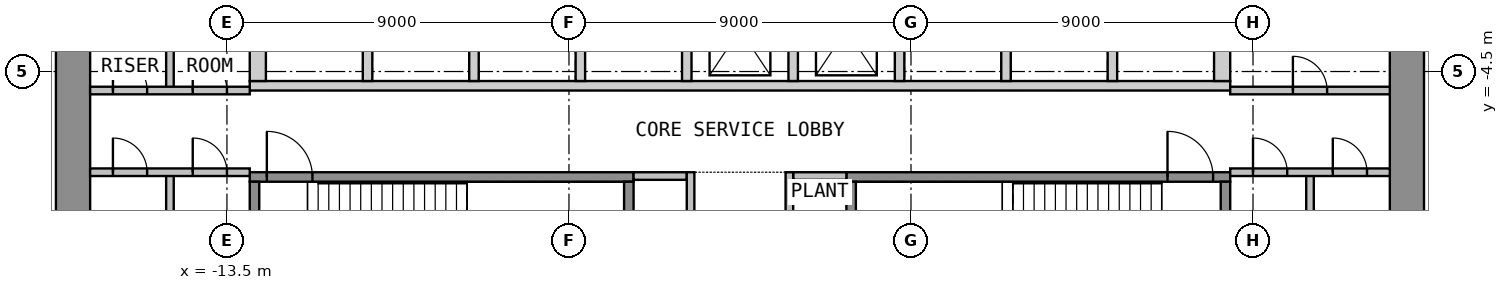
"""IFC4 building model, lengths in metres.
Left out: names, types, materials, properties, quantities, classifications, styles, units other than length and angle.
Written with IfcOpenShell. Run it as: python <this file> out.ifc"""

import sys

from ifc_helpers import new_model, si_unit, direction, frame, frame_2d, origin, place, context, subcontext, project, spatial, polyline, rectangle, outline, extrude, element, fill, save


model = new_model("IFC4")
c1 = context("Model", 3, precision=1e-05, world=origin(), true_north=direction((0.0, 1.0)))
c2 = subcontext(c1, "Body", "Model", "MODEL_VIEW")
j1 = project(units=[si_unit("LENGTHUNIT", "METRE"), si_unit("PLANEANGLEUNIT", "RADIAN")], contexts=[c1])
p1 = place(None, origin())
s1 = spatial("IfcSite", under=j1, at=p1, CompositionType="ELEMENT")
p2 = place(p1, origin())
s2 = spatial("IfcBuilding", under=s1, at=p2, CompositionType="ELEMENT")
p3 = place(p2, frame((0.0, 0.0, -5.0)))
s3 = spatial("IfcBuildingStorey", under=s2, at=p3, CompositionType="ELEMENT", Elevation=-5.0)
p4 = place(p3, frame((-17.55, -12.6, 0.0), z_axis=(0.0, 0.0, 1.0), x_axis=(0.0, 1.0, 0.0)))
e1 = element("IfcWall", 1, at=p4, inside=s3, PredefinedType="SHEAR", context=c2, shape_type="SweptSolid", body=[
    extrude(rectangle(XDim=25.2, YDim=0.9, at=frame_2d((12.6, 0.0))), origin(), (0.0, 0.0, 1.0), 4.55),
])
p5 = place(p4, frame((11.4, 0.0, 0.0)))
e2 = element("IfcOpeningElement", 2, at=p5, cuts=e1, PredefinedType="OPENING", context=c2, shape_type="SweptSolid", body=[
    extrude(rectangle(XDim=2.4, YDim=2.1, at=frame_2d((1.2, 1.05))), frame((0.0, 0.46, 0.0), z_axis=(0.0, -1.0, 0.0), x_axis=(1.0, 0.0, 0.0)), (0.0, 0.0, 1.0), 0.92),
])
p6 = place(p3, frame((17.55, -12.6, 0.0), z_axis=(0.0, 0.0, 1.0), x_axis=(0.0, 1.0, 0.0)))
e3 = element("IfcWall", 3, at=p6, inside=s3, PredefinedType="SHEAR", context=c2, shape_type="SweptSolid", body=[
    extrude(rectangle(XDim=25.2, YDim=0.9, at=frame_2d((12.6, 0.0))), origin(), (0.0, 0.0, 1.0), 4.55),
])
p7 = place(p6, frame((11.4, 0.0, 0.0)))
e4 = element("IfcOpeningElement", 4, at=p7, cuts=e3, PredefinedType="OPENING", context=c2, shape_type="SweptSolid", body=[
    extrude(rectangle(XDim=2.4, YDim=2.1, at=frame_2d((1.2, 1.05))), frame((0.0, 0.46, 0.0), z_axis=(0.0, -1.0, 0.0), x_axis=(1.0, 0.0, 0.0)), (0.0, 0.0, 1.0), 0.92),
])
p8 = place(p3, origin())
e5 = element("IfcWall", 5, at=p8, inside=s3, PredefinedType="SHEAR", context=c2, shape_type="SweptSolid", body=[
    extrude(outline(polyline([(-12.9, -5.0), (12.9, -5.0), (12.9, -4.75), (-12.9, -4.75), (-12.9, -5.0)])), origin(), (0.0, 0.0, 1.0), 4.55),
])
p9 = place(p3, origin())
e6 = element("IfcWall", 6, at=p9, inside=s3, PredefinedType="SHEAR", context=c2, shape_type="SweptSolid", body=[
    extrude(outline(polyline([(-12.9, -4.75), (-12.475, -4.75), (-12.475, -2.05), (-12.9, -2.05), (-12.9, -4.75)])), origin(), (0.0, 0.0, 1.0), 4.55),
])
p10 = place(p3, origin())
e7 = element("IfcWall", 7, at=p10, inside=s3, PredefinedType="SHEAR", context=c2, shape_type="SweptSolid", body=[
    extrude(outline(polyline([(-9.925, -4.75), (-9.675, -4.75), (-9.675, -2.05), (-9.925, -2.05), (-9.925, -4.75)])), origin(), (0.0, 0.0, 1.0), 4.55),
])
p11 = place(p3, origin())
e8 = element("IfcWall", 8, at=p11, inside=s3, PredefinedType="SHEAR", context=c2, shape_type="SweptSolid", body=[
    extrude(outline(polyline([(-7.125, -4.75), (-6.875, -4.75), (-6.875, -2.05), (-7.125, -2.05), (-7.125, -4.75)])), origin(), (0.0, 0.0, 1.0), 4.55),
])
p12 = place(p3, origin())
e9 = element("IfcWall", 9, at=p12, inside=s3, PredefinedType="SHEAR", context=c2, shape_type="SweptSolid", body=[
    extrude(outline(polyline([(-4.325, -4.75), (-4.075, -4.75), (-4.075, -2.05), (-4.325, -2.05), (-4.325, -4.75)])), origin(), (0.0, 0.0, 1.0), 4.55),
])
p13 = place(p3, origin())
e10 = element("IfcWall", 10, at=p13, inside=s3, PredefinedType="SHEAR", context=c2, shape_type="SweptSolid", body=[
    extrude(outline(polyline([(-1.525, -4.75), (-1.275, -4.75), (-1.275, -2.05), (-1.525, -2.05), (-1.525, -4.75)])), origin(), (0.0, 0.0, 1.0), 4.55),
])
p14 = place(p3, origin())
e11 = element("IfcWall", 11, at=p14, inside=s3, PredefinedType="SHEAR", context=c2, shape_type="SweptSolid", body=[
    extrude(outline(polyline([(1.275, -4.75), (1.525, -4.75), (1.525, -2.05), (1.275, -2.05), (1.275, -4.75)])), origin(), (0.0, 0.0, 1.0), 4.55),
])
p15 = place(p3, origin())
e12 = element("IfcWall", 12, at=p15, inside=s3, PredefinedType="SHEAR", context=c2, shape_type="SweptSolid", body=[
    extrude(outline(polyline([(4.075, -4.75), (4.325, -4.75), (4.325, -2.05), (4.075, -2.05), (4.075, -4.75)])), origin(), (0.0, 0.0, 1.0), 4.55),
])
p16 = place(p3, origin())
e13 = element("IfcWall", 13, at=p16, inside=s3, PredefinedType="SHEAR", context=c2, shape_type="SweptSolid", body=[
    extrude(outline(polyline([(6.875, -4.75), (7.125, -4.75), (7.125, -2.05), (6.875, -2.05), (6.875, -4.75)])), origin(), (0.0, 0.0, 1.0), 4.55),
])
p17 = place(p3, origin())
e14 = element("IfcWall", 14, at=p17, inside=s3, PredefinedType="SHEAR", context=c2, shape_type="SweptSolid", body=[
    extrude(outline(polyline([(9.675, -4.75), (9.925, -4.75), (9.925, -2.05), (9.675, -2.05), (9.675, -4.75)])), origin(), (0.0, 0.0, 1.0), 4.55),
])
p18 = place(p3, origin())
e15 = element("IfcWall", 15, at=p18, inside=s3, PredefinedType="SHEAR", context=c2, shape_type="SweptSolid", body=[
    extrude(outline(polyline([(12.475, -4.75), (12.9, -4.75), (12.9, -2.05), (12.475, -2.05), (12.475, -4.75)])), origin(), (0.0, 0.0, 1.0), 4.55),
])
p19 = place(p3, frame((-12.9, -7.275, 0.0), z_axis=(0.0, 0.0, 1.0), x_axis=(1.0, 0.0, 0.0)))
e16 = element("IfcWall", 16, at=p19, inside=s3, PredefinedType="SHEAR", context=c2, shape_type="SweptSolid", body=[
    extrude(rectangle(XDim=10.1, YDim=0.25, at=frame_2d((5.05, 0.0))), origin(), (0.0, 0.0, 1.0), 4.55),
])
p20 = place(p19, frame((0.45, 0.0, 0.0)))
e17 = element("IfcOpeningElement", 17, at=p20, cuts=e16, PredefinedType="OPENING", context=c2, shape_type="SweptSolid", body=[
    extrude(rectangle(XDim=1.2, YDim=2.1, at=frame_2d((0.6, 1.05))), frame((0.0, 0.135, 0.0), z_axis=(0.0, -1.0, 0.0), x_axis=(1.0, 0.0, 0.0)), (0.0, 0.0, 1.0), 0.27),
])
for number, where, z_axis, x_axis in (
    (18, (-12.775, -10.65, 0.0), (0.0, 0.0, 1.0), (0.0, 1.0, 0.0)),
    (19, (-2.925, -10.65, 0.0), (0.0, 0.0, 1.0), (0.0, 1.0, 0.0)),
):
    element("IfcWall", number, at=place(p3, frame(where, z_axis=z_axis, x_axis=x_axis)), inside=s3, PredefinedType="SHEAR", context=c2, shape_type="SweptSolid", body=[
        extrude(rectangle(XDim=3.25, YDim=0.25, at=frame_2d((1.625, 0.0))), origin(), (0.0, 0.0, 1.0), 4.55),
    ])
p21 = place(p3, frame((2.8, -7.275, 0.0), z_axis=(0.0, 0.0, 1.0), x_axis=(1.0, 0.0, 0.0)))
e20 = element("IfcWall", 20, at=p21, inside=s3, PredefinedType="SHEAR", context=c2, shape_type="SweptSolid", body=[
    extrude(rectangle(XDim=10.1, YDim=0.25, at=frame_2d((5.05, 0.0))), origin(), (0.0, 0.0, 1.0), 4.55),
])
p22 = place(p21, frame((8.45, 0.0, 0.0)))
e21 = element("IfcOpeningElement", 21, at=p22, cuts=e20, PredefinedType="OPENING", context=c2, shape_type="SweptSolid", body=[
    extrude(rectangle(XDim=1.2, YDim=2.1, at=frame_2d((0.6, 1.05))), frame((0.0, 0.135, 0.0), z_axis=(0.0, -1.0, 0.0), x_axis=(1.0, 0.0, 0.0)), (0.0, 0.0, 1.0), 0.27),
])
for number, where, z_axis, x_axis in (
    (22, (2.925, -10.65, 0.0), (0.0, 0.0, 1.0), (0.0, 1.0, 0.0)),
    (23, (12.775, -10.65, 0.0), (0.0, 0.0, 1.0), (0.0, 1.0, 0.0)),
):
    element("IfcWall", number, at=place(p3, frame(where, z_axis=z_axis, x_axis=x_axis)), inside=s3, PredefinedType="SHEAR", context=c2, shape_type="SweptSolid", body=[
        extrude(rectangle(XDim=3.25, YDim=0.25, at=frame_2d((1.625, 0.0))), origin(), (0.0, 0.0, 1.0), 4.55),
    ])
for number, where, z_axis, x_axis in (
    (24, (-2.8, -7.25, 0.0), (0.0, 0.0, 1.0), (1.0, 0.0, 0.0)),
    (25, (1.4, -7.25, 0.0), (0.0, 0.0, 1.0), (1.0, 0.0, 0.0)),
):
    element("IfcWall", number, at=place(p3, frame(where, z_axis=z_axis, x_axis=x_axis)), inside=s3, PredefinedType="PARTITIONING", context=c2, shape_type="SweptSolid", body=[
        extrude(rectangle(XDim=1.4, YDim=0.2, at=frame_2d((0.7, 0.0))), origin(), (0.0, 0.0, 1.0), 4.55),
    ])
p23 = place(p3, frame((-1.3, -12.6, 0.0), z_axis=(0.0, 0.0, 1.0), x_axis=(0.0, 1.0, 0.0)))
e26 = element("IfcWall", 26, at=p23, inside=s3, PredefinedType="PARTITIONING", context=c2, shape_type="SweptSolid", body=[
    extrude(rectangle(XDim=5.45, YDim=0.2, at=frame_2d((2.725, 0.0))), origin(), (0.0, 0.0, 1.0), 4.55),
])
p24 = place(p23, frame((2.175, 0.0, 0.0)))
e27 = element("IfcOpeningElement", 27, at=p24, cuts=e26, PredefinedType="OPENING", context=c2, shape_type="SweptSolid", body=[
    extrude(rectangle(XDim=0.9, YDim=2.1, at=frame_2d((0.45, 1.05))), frame((0.0, 0.11, 0.0), z_axis=(0.0, -1.0, 0.0), x_axis=(1.0, 0.0, 0.0)), (0.0, 0.0, 1.0), 0.22),
])
p25 = place(p3, frame((1.3, -12.6, 0.0), z_axis=(0.0, 0.0, 1.0), x_axis=(0.0, 1.0, 0.0)))
e28 = element("IfcWall", 28, at=p25, inside=s3, PredefinedType="PARTITIONING", context=c2, shape_type="SweptSolid", body=[
    extrude(rectangle(XDim=5.45, YDim=0.2, at=frame_2d((2.725, 0.0))), origin(), (0.0, 0.0, 1.0), 4.55),
])
p26 = place(p25, frame((0.863, 0.0, 0.0)))
e29 = element("IfcOpeningElement", 29, at=p26, cuts=e28, PredefinedType="OPENING", context=c2, shape_type="SweptSolid", body=[
    extrude(rectangle(XDim=0.9, YDim=2.1, at=frame_2d((0.45, 1.05))), frame((0.0, 0.11, 0.0), z_axis=(0.0, -1.0, 0.0), x_axis=(1.0, 0.0, 0.0)), (0.0, 0.0, 1.0), 0.22),
])
p27 = place(p25, frame((3.488, 0.0, 0.0)))
e30 = element("IfcOpeningElement", 30, at=p27, cuts=e28, PredefinedType="OPENING", context=c2, shape_type="SweptSolid", body=[
    extrude(rectangle(XDim=0.9, YDim=2.1, at=frame_2d((0.45, 1.05))), frame((0.0, 0.11, 0.0), z_axis=(0.0, -1.0, 0.0), x_axis=(1.0, 0.0, 0.0)), (0.0, 0.0, 1.0), 0.22),
])
p28 = place(p3, frame((-15.0, -12.6, 0.0), z_axis=(0.0, 0.0, 1.0), x_axis=(0.0, 1.0, 0.0)))
e31 = element("IfcWall", 31, at=p28, inside=s3, PredefinedType="PARTITIONING", context=c2, shape_type="SweptSolid", body=[
    extrude(rectangle(XDim=5.45, YDim=0.2, at=frame_2d((2.725, 0.0))), origin(), (0.0, 0.0, 1.0), 4.55),
])
p29 = place(p3, frame((-17.1, -7.15, 0.0), z_axis=(0.0, 0.0, 1.0), x_axis=(1.0, 0.0, 0.0)))
e32 = element("IfcWall", 32, at=p29, inside=s3, PredefinedType="PARTITIONING", context=c2, shape_type="SweptSolid", body=[
    extrude(rectangle(XDim=4.2, YDim=0.2, at=frame_2d((2.1, 0.0))), origin(), (0.0, 0.0, 1.0), 4.55),
])
p30 = place(p29, frame((0.6, 0.0, 0.0)))
e33 = element("IfcOpeningElement", 33, at=p30, cuts=e32, PredefinedType="OPENING", context=c2, shape_type="SweptSolid", body=[
    extrude(rectangle(XDim=0.9, YDim=2.1, at=frame_2d((0.45, 1.05))), frame((0.0, 0.11, 0.0), z_axis=(0.0, -1.0, 0.0), x_axis=(1.0, 0.0, 0.0)), (0.0, 0.0, 1.0), 0.22),
])
p31 = place(p29, frame((2.7, 0.0, 0.0)))
e34 = element("IfcOpeningElement", 34, at=p31, cuts=e32, PredefinedType="OPENING", context=c2, shape_type="SweptSolid", body=[
    extrude(rectangle(XDim=0.9, YDim=2.1, at=frame_2d((0.45, 1.05))), frame((0.0, 0.11, 0.0), z_axis=(0.0, -1.0, 0.0), x_axis=(1.0, 0.0, 0.0)), (0.0, 0.0, 1.0), 0.22),
])
p32 = place(p3, frame((-15.0, -5.0, 0.0), z_axis=(0.0, 0.0, 1.0), x_axis=(0.0, 1.0, 0.0)))
e35 = element("IfcWall", 35, at=p32, inside=s3, PredefinedType="PARTITIONING", context=c2, shape_type="SweptSolid", body=[
    extrude(rectangle(XDim=3.2, YDim=0.2, at=frame_2d((1.6, 0.0))), origin(), (0.0, 0.0, 1.0), 4.55),
])
p33 = place(p3, frame((-17.1, -5.0, 0.0), z_axis=(0.0, 0.0, 1.0), x_axis=(1.0, 0.0, 0.0)))
e36 = element("IfcWall", 36, at=p33, inside=s3, PredefinedType="PARTITIONING", context=c2, shape_type="SweptSolid", body=[
    extrude(rectangle(XDim=4.2, YDim=0.2, at=frame_2d((2.1, 0.0))), origin(), (0.0, 0.0, 1.0), 4.55),
])
p34 = place(p33, frame((0.6, 0.0, 0.0)))
e37 = element("IfcOpeningElement", 37, at=p34, cuts=e36, PredefinedType="OPENING", context=c2, shape_type="SweptSolid", body=[
    extrude(rectangle(XDim=0.9, YDim=2.1, at=frame_2d((0.45, 1.05))), frame((0.0, 0.11, 0.0), z_axis=(0.0, -1.0, 0.0), x_axis=(1.0, 0.0, 0.0)), (0.0, 0.0, 1.0), 0.22),
])
p35 = place(p33, frame((2.7, 0.0, 0.0)))
e38 = element("IfcOpeningElement", 38, at=p35, cuts=e36, PredefinedType="OPENING", context=c2, shape_type="SweptSolid", body=[
    extrude(rectangle(XDim=0.9, YDim=2.1, at=frame_2d((0.45, 1.05))), frame((0.0, 0.11, 0.0), z_axis=(0.0, -1.0, 0.0), x_axis=(1.0, 0.0, 0.0)), (0.0, 0.0, 1.0), 0.22),
])
p36 = place(p3, frame((15.0, -12.6, 0.0), z_axis=(0.0, 0.0, 1.0), x_axis=(0.0, 1.0, 0.0)))
e39 = element("IfcWall", 39, at=p36, inside=s3, PredefinedType="PARTITIONING", context=c2, shape_type="SweptSolid", body=[
    extrude(rectangle(XDim=5.45, YDim=0.2, at=frame_2d((2.725, 0.0))), origin(), (0.0, 0.0, 1.0), 4.55),
])
p37 = place(p3, frame((12.9, -7.15, 0.0), z_axis=(0.0, 0.0, 1.0), x_axis=(1.0, 0.0, 0.0)))
e40 = element("IfcWall", 40, at=p37, inside=s3, PredefinedType="PARTITIONING", context=c2, shape_type="SweptSolid", body=[
    extrude(rectangle(XDim=4.2, YDim=0.2, at=frame_2d((2.1, 0.0))), origin(), (0.0, 0.0, 1.0), 4.55),
])
p38 = place(p37, frame((0.6, 0.0, 0.0)))
e41 = element("IfcOpeningElement", 41, at=p38, cuts=e40, PredefinedType="OPENING", context=c2, shape_type="SweptSolid", body=[
    extrude(rectangle(XDim=0.9, YDim=2.1, at=frame_2d((0.45, 1.05))), frame((0.0, 0.11, 0.0), z_axis=(0.0, -1.0, 0.0), x_axis=(1.0, 0.0, 0.0)), (0.0, 0.0, 1.0), 0.22),
])
p39 = place(p37, frame((2.7, 0.0, 0.0)))
e42 = element("IfcOpeningElement", 42, at=p39, cuts=e40, PredefinedType="OPENING", context=c2, shape_type="SweptSolid", body=[
    extrude(rectangle(XDim=0.9, YDim=2.1, at=frame_2d((0.45, 1.05))), frame((0.0, 0.11, 0.0), z_axis=(0.0, -1.0, 0.0), x_axis=(1.0, 0.0, 0.0)), (0.0, 0.0, 1.0), 0.22),
])
p40 = place(p3, frame((12.9, -5.0, 0.0), z_axis=(0.0, 0.0, 1.0), x_axis=(1.0, 0.0, 0.0)))
e43 = element("IfcWall", 43, at=p40, inside=s3, PredefinedType="PARTITIONING", context=c2, shape_type="SweptSolid", body=[
    extrude(rectangle(XDim=4.2, YDim=0.2, at=frame_2d((2.1, 0.0))), origin(), (0.0, 0.0, 1.0), 4.55),
])
p41 = place(p40, frame((1.65, 0.0, 0.0)))
e44 = element("IfcOpeningElement", 44, at=p41, cuts=e43, PredefinedType="OPENING", context=c2, shape_type="SweptSolid", body=[
    extrude(rectangle(XDim=0.9, YDim=2.1, at=frame_2d((0.45, 1.05))), frame((0.0, 0.11, 0.0), z_axis=(0.0, -1.0, 0.0), x_axis=(1.0, 0.0, 0.0)), (0.0, 0.0, 1.0), 0.22),
])
p42 = place(p20, origin())
e45 = element("IfcDoor", 45, at=p42, inside=s3, OperationType="SINGLE_SWING_LEFT", PredefinedType="DOOR", context=c2, shape_type="SweptSolid", body=[
    extrude(rectangle(XDim=1.2, YDim=2.1, at=frame_2d((0.6, 1.05))), frame((0.0, 0.025, 0.0), z_axis=(0.0, -1.0, 0.0), x_axis=(1.0, 0.0, 0.0)), (0.0, 0.0, 1.0), 0.05),
])
fill(e17, e45)
p43 = place(p22, origin())
e46 = element("IfcDoor", 46, at=p43, inside=s3, OperationType="SINGLE_SWING_LEFT", PredefinedType="DOOR", context=c2, shape_type="SweptSolid", body=[
    extrude(rectangle(XDim=1.2, YDim=2.1, at=frame_2d((0.6, 1.05))), frame((0.0, 0.025, 0.0), z_axis=(0.0, -1.0, 0.0), x_axis=(1.0, 0.0, 0.0)), (0.0, 0.0, 1.0), 0.05),
])
fill(e21, e46)
p44 = place(p30, origin())
e47 = element("IfcDoor", 47, at=p44, inside=s3, OperationType="SINGLE_SWING_LEFT", PredefinedType="DOOR", context=c2, shape_type="SweptSolid", body=[
    extrude(rectangle(XDim=0.9, YDim=2.1, at=frame_2d((0.45, 1.05))), frame((0.0, 0.025, 0.0), z_axis=(0.0, -1.0, 0.0), x_axis=(1.0, 0.0, 0.0)), (0.0, 0.0, 1.0), 0.05),
])
fill(e33, e47)
p45 = place(p31, origin())
e48 = element("IfcDoor", 48, at=p45, inside=s3, OperationType="SINGLE_SWING_LEFT", PredefinedType="DOOR", context=c2, shape_type="SweptSolid", body=[
    extrude(rectangle(XDim=0.9, YDim=2.1, at=frame_2d((0.45, 1.05))), frame((0.0, 0.025, 0.0), z_axis=(0.0, -1.0, 0.0), x_axis=(1.0, 0.0, 0.0)), (0.0, 0.0, 1.0), 0.05),
])
fill(e34, e48)
p46 = place(p34, origin())
e49 = element("IfcDoor", 49, at=p46, inside=s3, OperationType="SINGLE_SWING_LEFT", PredefinedType="DOOR", context=c2, shape_type="SweptSolid", body=[
    extrude(rectangle(XDim=0.9, YDim=2.1, at=frame_2d((0.45, 1.05))), frame((0.0, 0.025, 0.0), z_axis=(0.0, -1.0, 0.0), x_axis=(1.0, 0.0, 0.0)), (0.0, 0.0, 1.0), 0.05),
])
fill(e37, e49)
p47 = place(p35, origin())
e50 = element("IfcDoor", 50, at=p47, inside=s3, OperationType="SINGLE_SWING_LEFT", PredefinedType="DOOR", context=c2, shape_type="SweptSolid", body=[
    extrude(rectangle(XDim=0.9, YDim=2.1, at=frame_2d((0.45, 1.05))), frame((0.0, 0.025, 0.0), z_axis=(0.0, -1.0, 0.0), x_axis=(1.0, 0.0, 0.0)), (0.0, 0.0, 1.0), 0.05),
])
fill(e38, e50)
p48 = place(p38, origin())
e51 = element("IfcDoor", 51, at=p48, inside=s3, OperationType="SINGLE_SWING_LEFT", PredefinedType="DOOR", context=c2, shape_type="SweptSolid", body=[
    extrude(rectangle(XDim=0.9, YDim=2.1, at=frame_2d((0.45, 1.05))), frame((0.0, 0.025, 0.0), z_axis=(0.0, -1.0, 0.0), x_axis=(1.0, 0.0, 0.0)), (0.0, 0.0, 1.0), 0.05),
])
fill(e41, e51)
p49 = place(p39, origin())
e52 = element("IfcDoor", 52, at=p49, inside=s3, OperationType="SINGLE_SWING_LEFT", PredefinedType="DOOR", context=c2, shape_type="SweptSolid", body=[
    extrude(rectangle(XDim=0.9, YDim=2.1, at=frame_2d((0.45, 1.05))), frame((0.0, 0.025, 0.0), z_axis=(0.0, -1.0, 0.0), x_axis=(1.0, 0.0, 0.0)), (0.0, 0.0, 1.0), 0.05),
])
fill(e42, e52)
p50 = place(p41, origin())
e53 = element("IfcDoor", 53, at=p50, inside=s3, OperationType="SINGLE_SWING_LEFT", PredefinedType="DOOR", context=c2, shape_type="SweptSolid", body=[
    extrude(rectangle(XDim=0.9, YDim=2.1, at=frame_2d((0.45, 1.05))), frame((0.0, 0.025, 0.0), z_axis=(0.0, -1.0, 0.0), x_axis=(1.0, 0.0, 0.0)), (0.0, 0.0, 1.0), 0.05),
])
fill(e44, e53)
save(model, sys.argv[1])
